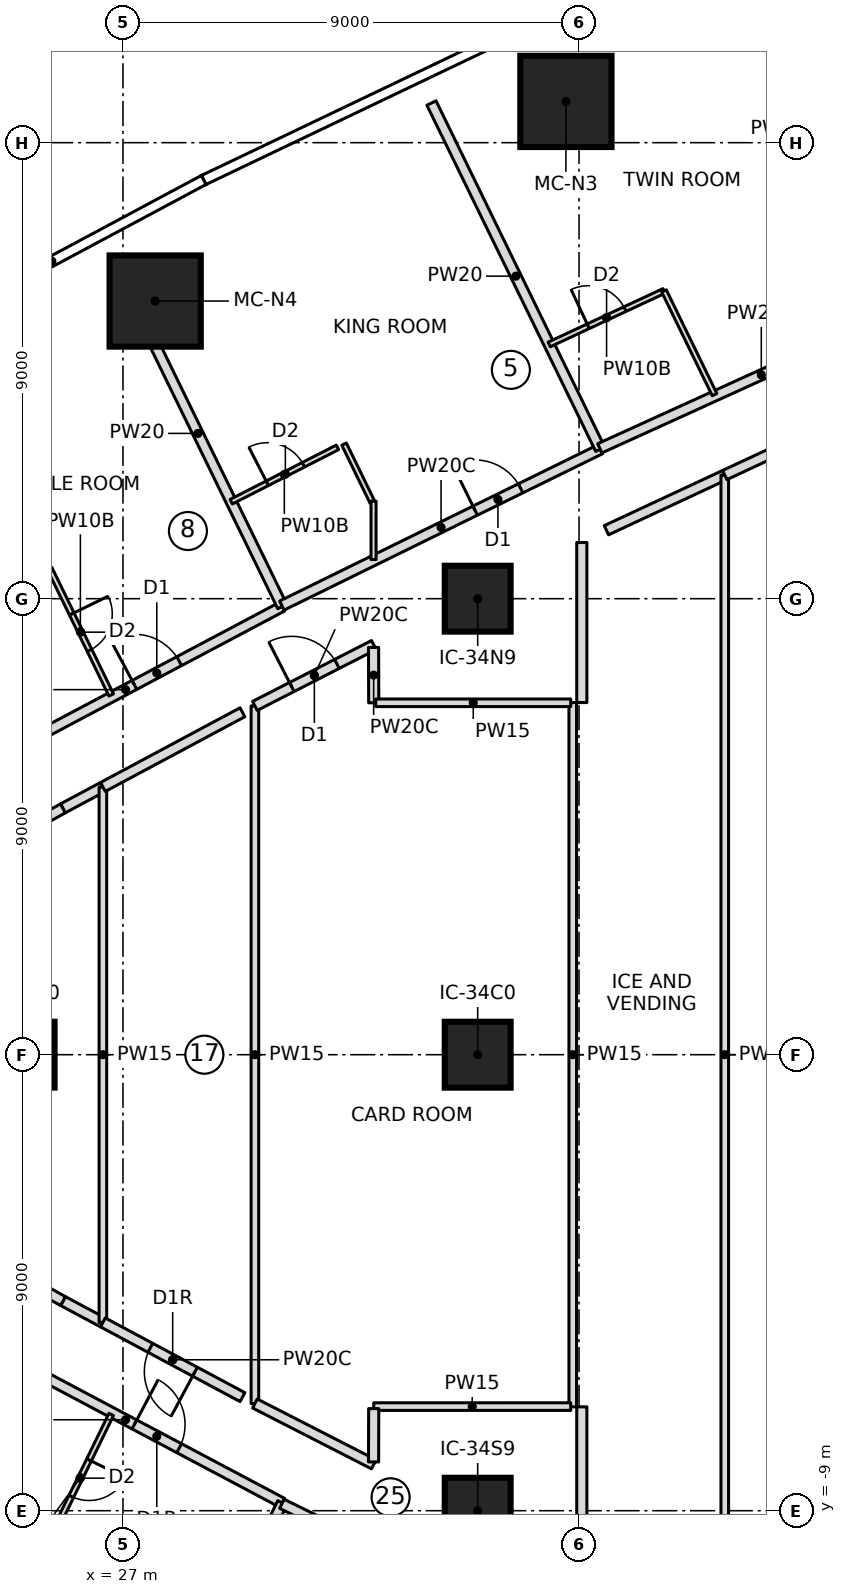
"""IFC4 building model, lengths in metres.
Left out: names, types, materials, properties, quantities, classifications, styles, units other than length and angle.
Written with IfcOpenShell. Run it as: python <this file> out.ifc"""

import sys

from ifc_helpers import new_model, si_unit, direction, frame, frame_2d, origin, origin_2d, place, context, subcontext, project, spatial, rectangle, extrude, element, fill, save


model = new_model("IFC4")
c1 = context("Model", 3, precision=1e-05, world=origin(), true_north=direction((0.0, 1.0)))
c2 = subcontext(c1, "Body", "Model", "MODEL_VIEW")
j1 = project(units=[si_unit("LENGTHUNIT", "METRE"), si_unit("PLANEANGLEUNIT", "RADIAN")], contexts=[c1])
p1 = place(None, origin())
s1 = spatial("IfcSite", under=j1, at=p1, CompositionType="ELEMENT")
p2 = place(p1, origin())
s2 = spatial("IfcBuilding", under=s1, at=p2, CompositionType="ELEMENT")
p3 = place(p2, frame((0.0, 0.0, 71.55)))
s3 = spatial("IfcBuildingStorey", under=s2, at=p3, CompositionType="ELEMENT", Elevation=71.55)
for number, where, z_axis, x_axis in (
    (1, (35.741, 18.814, 0.0), (0.0, 0.0, 1.0), (1.0, 0.0, 0.0)),
    (2, (27.635, 14.874, 0.0), (0.0, 0.0, 1.0), (1.0, 0.0, 0.0)),
):
    element("IfcColumn", number, at=place(p3, frame(where, z_axis=z_axis, x_axis=x_axis)), inside=s3, PredefinedType="COLUMN", context=c2, shape_type="SweptSolid", body=[
        extrude(rectangle(XDim=1.8, YDim=1.8, at=origin_2d()), origin(), (0.0, 0.0, 1.0), 3.55),
    ])
for number, where, z_axis, x_axis in (
    (3, (25.0, 0.0, 0.0), (0.0, 0.0, 1.0), (1.0, 0.0, 0.0)),
    (4, (34.0, -9.0, 0.0), (0.0, 0.0, 1.0), (1.0, 0.0, 0.0)),
    (5, (34.0, 0.0, 0.0), (0.0, 0.0, 1.0), (1.0, 0.0, 0.0)),
    (6, (34.0, 9.0, 0.0), (0.0, 0.0, 1.0), (1.0, 0.0, 0.0)),
):
    element("IfcColumn", number, at=place(p3, frame(where, z_axis=z_axis, x_axis=x_axis)), inside=s3, PredefinedType="COLUMN", context=c2, shape_type="SweptSolid", body=[
        extrude(rectangle(XDim=1.3, YDim=1.3, at=origin_2d()), origin(), (0.0, 0.0, 1.0), 3.55),
    ])
p4 = place(p3, frame((23.957, 5.564, 0.0), z_axis=(0.0, 0.0, 1.0), x_axis=(0.883455325405, 0.468515408513, 0.0)))
e7 = element("IfcWall", 7, at=p4, inside=s3, PredefinedType="PARTITIONING", context=c2, shape_type="SweptSolid", body=[
    extrude(rectangle(XDim=7.004, YDim=0.2, at=frame_2d((3.502, 0.0))), origin(), (0.0, 0.0, 1.0), 3.15),
])
p5 = place(p4, frame((3.7, 0.0, 0.0)))
e8 = element("IfcOpeningElement", 8, at=p5, cuts=e7, PredefinedType="OPENING", context=c2, shape_type="SweptSolid", body=[
    extrude(rectangle(XDim=1.0, YDim=2.1, at=frame_2d((0.5, 1.05))), frame((0.0, 0.11, 0.0), z_axis=(0.0, -1.0, 0.0), x_axis=(1.0, 0.0, 0.0)), (0.0, 0.0, 1.0), 0.22),
])
p6 = place(p3, frame((25.55, 9.597, 0.0), z_axis=(0.0, 0.0, 1.0), x_axis=(0.43822975423, -0.898862994292, 0.0)))
e9 = element("IfcWall", 9, at=p6, inside=s3, PredefinedType="PARTITIONING", context=c2, shape_type="SweptSolid", body=[
    extrude(rectangle(XDim=2.779, YDim=0.1, at=frame_2d((1.389, 0.0))), origin(), (0.0, 0.0, 1.0), 3.15),
])
p7 = place(p6, frame((1.0, 0.0, 0.0)))
e10 = element("IfcOpeningElement", 10, at=p7, cuts=e9, PredefinedType="OPENING", context=c2, shape_type="SweptSolid", body=[
    extrude(rectangle(XDim=0.8, YDim=2.1, at=frame_2d((0.4, 1.05))), frame((0.0, 0.06, 0.0), z_axis=(0.0, -1.0, 0.0), x_axis=(1.0, 0.0, 0.0)), (0.0, 0.0, 1.0), 0.12),
])
p8 = place(p3, frame((30.144, 8.846, 0.0), z_axis=(0.0, 0.0, 1.0), x_axis=(-0.438185054829, 0.898884785567, 0.0)))
e11 = element("IfcWall", 11, at=p8, inside=s3, PredefinedType="PARTITIONING", context=c2, shape_type="SweptSolid", body=[
    extrude(rectangle(XDim=7.601, YDim=0.2, at=frame_2d((3.801, 0.0))), origin(), (0.0, 0.0, 1.0), 3.15),
])
p9 = place(p3, frame((30.135, 8.864, 0.0), z_axis=(0.0, 0.0, 1.0), x_axis=(0.897599118183, 0.44081268475, 0.0)))
e12 = element("IfcWall", 12, at=p9, inside=s3, PredefinedType="PARTITIONING", context=c2, shape_type="SweptSolid", body=[
    extrude(rectangle(XDim=7.0, YDim=0.2, at=frame_2d((3.5, 0.0))), origin(), (0.0, 0.0, 1.0), 3.15),
])
p10 = place(p9, frame((4.25, 0.0, 0.0)))
e13 = element("IfcOpeningElement", 13, at=p10, cuts=e12, PredefinedType="OPENING", context=c2, shape_type="SweptSolid", body=[
    extrude(rectangle(XDim=1.0, YDim=2.1, at=frame_2d((0.5, 1.05))), frame((0.0, 0.11, 0.0), z_axis=(0.0, -1.0, 0.0), x_axis=(1.0, 0.0, 0.0)), (0.0, 0.0, 1.0), 0.22),
])
p11 = place(p3, frame((29.136, 10.914, 0.0), z_axis=(0.0, 0.0, 1.0), x_axis=(0.890219804082, 0.45553122881, 0.0)))
e14 = element("IfcWall", 14, at=p11, inside=s3, PredefinedType="PARTITIONING", context=c2, shape_type="SweptSolid", body=[
    extrude(rectangle(XDim=2.354, YDim=0.1, at=frame_2d((1.177, 0.0))), origin(), (0.0, 0.0, 1.0), 3.15),
])
p12 = place(p11, frame((0.8, 0.0, 0.0)))
e15 = element("IfcOpeningElement", 15, at=p12, cuts=e14, PredefinedType="OPENING", context=c2, shape_type="SweptSolid", body=[
    extrude(rectangle(XDim=0.8, YDim=2.1, at=frame_2d((0.4, 1.05))), frame((0.0, 0.06, 0.0), z_axis=(0.0, -1.0, 0.0), x_axis=(1.0, 0.0, 0.0)), (0.0, 0.0, 1.0), 0.12),
])
p13 = place(p3, frame((31.363, 12.05, 0.0), z_axis=(0.0, 0.0, 1.0), x_axis=(0.438356099343, -0.898801385273, 0.0)))
e16 = element("IfcWall", 16, at=p13, inside=s3, PredefinedType="PARTITIONING", context=c2, shape_type="SweptSolid", body=[
    extrude(rectangle(XDim=1.282, YDim=0.1, at=frame_2d((0.641, 0.0))), origin(), (0.0, 0.0, 1.0), 3.15),
])
p14 = place(p3, frame((36.419, 11.949, 0.0), z_axis=(0.0, 0.0, 1.0), x_axis=(-0.438197705697, 0.898878618459, 0.0)))
e17 = element("IfcWall", 17, at=p14, inside=s3, PredefinedType="PARTITIONING", context=c2, shape_type="SweptSolid", body=[
    extrude(rectangle(XDim=7.601, YDim=0.2, at=frame_2d((3.801, 0.0))), origin(), (0.0, 0.0, 1.0), 3.15),
])
p15 = place(p3, frame((42.784, 14.867, 0.0), z_axis=(0.0, 0.0, 1.0), x_axis=(-0.910238677692, -0.414083988622, 0.0)))
e18 = element("IfcWall", 18, at=p15, inside=s3, PredefinedType="PARTITIONING", context=c2, shape_type="SweptSolid", body=[
    extrude(rectangle(XDim=7.003, YDim=0.2, at=frame_2d((3.501, 0.0))), origin(), (0.0, 0.0, 1.0), 3.15),
])
p16 = place(p15, frame((0.35, 0.0, 0.0)))
e19 = element("IfcOpeningElement", 19, at=p16, cuts=e18, PredefinedType="OPENING", context=c2, shape_type="SweptSolid", body=[
    extrude(rectangle(XDim=1.0, YDim=2.1, at=frame_2d((0.5, 1.05))), frame((0.0, 0.11, 0.0), z_axis=(0.0, -1.0, 0.0), x_axis=(1.0, 0.0, 0.0)), (0.0, 0.0, 1.0), 0.22),
])
p17 = place(p3, frame((35.411, 14.017, 0.0), z_axis=(0.0, 0.0, 1.0), x_axis=(0.906317797926, 0.422596792655, 0.0)))
e20 = element("IfcWall", 20, at=p17, inside=s3, PredefinedType="PARTITIONING", context=c2, shape_type="SweptSolid", body=[
    extrude(rectangle(XDim=2.5, YDim=0.1, at=frame_2d((1.25, 0.0))), origin(), (0.0, 0.0, 1.0), 3.15),
])
p18 = place(p17, frame((0.85, 0.0, 0.0)))
e21 = element("IfcOpeningElement", 21, at=p18, cuts=e20, PredefinedType="OPENING", context=c2, shape_type="SweptSolid", body=[
    extrude(rectangle(XDim=0.8, YDim=2.1, at=frame_2d((0.4, 1.05))), frame((0.0, 0.06, 0.0), z_axis=(0.0, -1.0, 0.0), x_axis=(1.0, 0.0, 0.0)), (0.0, 0.0, 1.0), 0.12),
])
p19 = place(p3, frame((37.677, 15.073, 0.0), z_axis=(0.0, 0.0, 1.0), x_axis=(0.43818492173, -0.89888485045, 0.0)))
e22 = element("IfcWall", 22, at=p19, inside=s3, PredefinedType="PARTITIONING", context=c2, shape_type="SweptSolid", body=[
    extrude(rectangle(XDim=2.277, YDim=0.1, at=frame_2d((1.139, 0.0))), origin(), (0.0, 0.0, 1.0), 3.15),
])
p20 = place(p3, frame((42.793, 14.849, 0.0), z_axis=(0.0, 0.0, 1.0), x_axis=(-0.438214892445, 0.898870239823, 0.0)))
e23 = element("IfcWall", 23, at=p20, inside=s3, PredefinedType="PARTITIONING", context=c2, shape_type="SweptSolid", body=[
    extrude(rectangle(XDim=7.605, YDim=0.2, at=frame_2d((3.802, 0.0))), origin(), (0.0, 0.0, 1.0), 3.15),
])
p21 = place(p3, frame((23.957, -5.564, 0.0), z_axis=(0.0, 0.0, 1.0), x_axis=(0.883455325405, -0.468515408513, 0.0)))
e24 = element("IfcWall", 24, at=p21, inside=s3, PredefinedType="PARTITIONING", context=c2, shape_type="SweptSolid", body=[
    extrude(rectangle(XDim=7.004, YDim=0.2, at=frame_2d((3.502, 0.0))), origin(), (0.0, 0.0, 1.0), 3.15),
])
p22 = place(p21, frame((3.7, 0.0, 0.0)))
e25 = element("IfcOpeningElement", 25, at=p22, cuts=e24, PredefinedType="OPENING", context=c2, shape_type="SweptSolid", body=[
    extrude(rectangle(XDim=1.0, YDim=2.1, at=frame_2d((0.5, 1.05))), frame((0.0, 0.11, 0.0), z_axis=(0.0, -1.0, 0.0), x_axis=(1.0, 0.0, 0.0)), (0.0, 0.0, 1.0), 0.22),
])
p23 = place(p3, frame((26.768, -7.1, 0.0), z_axis=(0.0, 0.0, 1.0), x_axis=(-0.43822975423, -0.898862994292, 0.0)))
e26 = element("IfcWall", 26, at=p23, inside=s3, PredefinedType="PARTITIONING", context=c2, shape_type="SweptSolid", body=[
    extrude(rectangle(XDim=2.779, YDim=0.1, at=frame_2d((1.389, 0.0))), origin(), (0.0, 0.0, 1.0), 3.15),
])
p24 = place(p23, frame((1.0, 0.0, 0.0)))
e27 = element("IfcOpeningElement", 27, at=p24, cuts=e26, PredefinedType="OPENING", context=c2, shape_type="SweptSolid", body=[
    extrude(rectangle(XDim=0.8, YDim=2.1, at=frame_2d((0.4, 1.05))), frame((0.0, 0.06, 0.0), z_axis=(0.0, -1.0, 0.0), x_axis=(1.0, 0.0, 0.0)), (0.0, 0.0, 1.0), 0.12),
])
p25 = place(p3, frame((26.813, -15.678, 0.0), z_axis=(0.0, 0.0, 1.0), x_axis=(0.438185054829, 0.898884785567, 0.0)))
e28 = element("IfcWall", 28, at=p25, inside=s3, PredefinedType="PARTITIONING", context=c2, shape_type="SweptSolid", body=[
    extrude(rectangle(XDim=7.601, YDim=0.2, at=frame_2d((3.801, 0.0))), origin(), (0.0, 0.0, 1.0), 3.15),
])
p26 = place(p3, frame((30.135, -8.864, 0.0), z_axis=(0.0, 0.0, 1.0), x_axis=(0.897599118183, -0.44081268475, 0.0)))
e29 = element("IfcWall", 29, at=p26, inside=s3, PredefinedType="PARTITIONING", context=c2, shape_type="SweptSolid", body=[
    extrude(rectangle(XDim=7.0, YDim=0.2, at=frame_2d((3.5, 0.0))), origin(), (0.0, 0.0, 1.0), 3.15),
])
p27 = place(p26, frame((4.25, 0.0, 0.0)))
e30 = element("IfcOpeningElement", 30, at=p27, cuts=e29, PredefinedType="OPENING", context=c2, shape_type="SweptSolid", body=[
    extrude(rectangle(XDim=1.0, YDim=2.1, at=frame_2d((0.5, 1.05))), frame((0.0, 0.11, 0.0), z_axis=(0.0, -1.0, 0.0), x_axis=(1.0, 0.0, 0.0)), (0.0, 0.0, 1.0), 0.22),
])
p28 = place(p3, frame((22.312, 2.903, 0.0), z_axis=(0.0, 0.0, 1.0), x_axis=(0.872800289292, 0.488077509225, 0.0)))
e31 = element("IfcWall", 31, at=p28, inside=s3, PredefinedType="PARTITIONING", context=c2, shape_type="SweptSolid", body=[
    extrude(rectangle(XDim=4.016, YDim=0.2, at=frame_2d((2.008, 0.0))), origin(), (0.0, 0.0, 1.0), 3.15),
])
p29 = place(p28, frame((1.508, 0.0, 0.0)))
e32 = element("IfcOpeningElement", 32, at=p29, cuts=e31, PredefinedType="OPENING", context=c2, shape_type="SweptSolid", body=[
    extrude(rectangle(XDim=1.0, YDim=2.1, at=frame_2d((0.5, 1.05))), frame((0.0, 0.11, 0.0), z_axis=(0.0, -1.0, 0.0), x_axis=(1.0, 0.0, 0.0)), (0.0, 0.0, 1.0), 0.22),
])
p30 = place(p3, frame((26.604, -5.284, 0.0), z_axis=(0.0, 0.0, 1.0), x_axis=(-0.881715816073, 0.471780902207, 0.0)))
e33 = element("IfcWall", 33, at=p30, inside=s3, PredefinedType="PARTITIONING", context=c2, shape_type="SweptSolid", body=[
    extrude(rectangle(XDim=0.892, YDim=0.2, at=frame_2d((0.446, 0.0))), origin(), (0.0, 0.0, 1.0), 3.15),
])
p31 = place(p3, frame((25.817, -4.863, 0.0), z_axis=(0.0, 0.0, 1.0), x_axis=(-0.872800289292, 0.488077509225, 0.0)))
e34 = element("IfcWall", 34, at=p31, inside=s3, PredefinedType="PARTITIONING", context=c2, shape_type="SweptSolid", body=[
    extrude(rectangle(XDim=4.016, YDim=0.2, at=frame_2d((2.008, 0.0))), origin(), (0.0, 0.0, 1.0), 3.15),
])
p32 = place(p3, frame((25.817, 4.863, 0.0), z_axis=(0.0, 0.0, 1.0), x_axis=(0.881715816073, 0.471780902207, 0.0)))
e35 = element("IfcWall", 35, at=p32, inside=s3, PredefinedType="PARTITIONING", context=c2, shape_type="SweptSolid", body=[
    extrude(rectangle(XDim=0.892, YDim=0.2, at=frame_2d((0.446, 0.0))), origin(), (0.0, 0.0, 1.0), 3.15),
])
p33 = place(p3, frame((26.604, -5.284, 0.0), z_axis=(0.0, 0.0, 1.0), x_axis=(0.0, 1.0, 0.0)))
e36 = element("IfcWall", 36, at=p33, inside=s3, PredefinedType="PARTITIONING", context=c2, shape_type="SweptSolid", body=[
    extrude(rectangle(XDim=10.568, YDim=0.15, at=frame_2d((5.284, 0.0))), origin(), (0.0, 0.0, 1.0), 3.15),
])
p34 = place(p3, frame((29.357, -6.758, 0.0), z_axis=(0.0, 0.0, 1.0), x_axis=(-0.881637943627, 0.471926409895, 0.0)))
e37 = element("IfcWall", 37, at=p34, inside=s3, PredefinedType="PARTITIONING", context=c2, shape_type="SweptSolid", body=[
    extrude(rectangle(XDim=3.124, YDim=0.2, at=frame_2d((1.562, 0.0))), origin(), (0.0, 0.0, 1.0), 3.15),
])
p35 = place(p34, frame((1.062, 0.0, 0.0)))
e38 = element("IfcOpeningElement", 38, at=p35, cuts=e37, PredefinedType="OPENING", context=c2, shape_type="SweptSolid", body=[
    extrude(rectangle(XDim=1.0, YDim=2.1, at=frame_2d((0.5, 1.05))), frame((0.0, 0.11, 0.0), z_axis=(0.0, -1.0, 0.0), x_axis=(1.0, 0.0, 0.0)), (0.0, 0.0, 1.0), 0.22),
])
p36 = place(p3, frame((26.604, 5.284, 0.0), z_axis=(0.0, 0.0, 1.0), x_axis=(0.881637943627, 0.471926409895, 0.0)))
e39 = element("IfcWall", 39, at=p36, inside=s3, PredefinedType="PARTITIONING", context=c2, shape_type="SweptSolid", body=[
    extrude(rectangle(XDim=3.124, YDim=0.2, at=frame_2d((1.562, 0.0))), origin(), (0.0, 0.0, 1.0), 3.15),
])
p37 = place(p3, frame((29.604, -6.884, 0.0), z_axis=(0.0, 0.0, 1.0), x_axis=(0.0, 1.0, 0.0)))
e40 = element("IfcWall", 40, at=p37, inside=s3, PredefinedType="PARTITIONING", context=c2, shape_type="SweptSolid", body=[
    extrude(rectangle(XDim=13.768, YDim=0.15, at=frame_2d((6.884, 0.0))), origin(), (0.0, 0.0, 1.0), 3.15),
])
p38 = place(p3, frame((29.604, 6.884, 0.0), z_axis=(0.0, 0.0, 1.0), x_axis=(0.890220210981, 0.455530433628, 0.0)))
e41 = element("IfcWall", 41, at=p38, inside=s3, PredefinedType="PARTITIONING", context=c2, shape_type="SweptSolid", body=[
    extrude(rectangle(XDim=2.636, YDim=0.2, at=frame_2d((1.318, 0.0))), origin(), (0.0, 0.0, 1.0), 3.15),
])
p39 = place(p38, frame((0.818, 0.0, 0.0)))
e42 = element("IfcOpeningElement", 42, at=p39, cuts=e41, PredefinedType="OPENING", context=c2, shape_type="SweptSolid", body=[
    extrude(rectangle(XDim=1.0, YDim=2.1, at=frame_2d((0.5, 1.05))), frame((0.0, 0.11, 0.0), z_axis=(0.0, -1.0, 0.0), x_axis=(1.0, 0.0, 0.0)), (0.0, 0.0, 1.0), 0.22),
])
p40 = place(p3, frame((31.95, -8.085, 0.0), z_axis=(0.0, 0.0, 1.0), x_axis=(-0.890220210981, 0.455530433628, 0.0)))
e43 = element("IfcWall", 43, at=p40, inside=s3, PredefinedType="PARTITIONING", context=c2, shape_type="SweptSolid", body=[
    extrude(rectangle(XDim=2.636, YDim=0.2, at=frame_2d((1.318, 0.0))), origin(), (0.0, 0.0, 1.0), 3.15),
])
p41 = place(p3, frame((35.876, -6.95, 0.0), z_axis=(0.0, 0.0, 1.0), x_axis=(0.0, 1.0, 0.0)))
e44 = element("IfcWall", 44, at=p41, inside=s3, PredefinedType="PARTITIONING", context=c2, shape_type="SweptSolid", body=[
    extrude(rectangle(XDim=13.9, YDim=0.15, at=frame_2d((6.95, 0.0))), origin(), (0.0, 0.0, 1.0), 3.15),
])
p42 = place(p3, frame((36.54, 10.351, 0.0), z_axis=(0.0, 0.0, 1.0), x_axis=(0.906347616376, 0.422532836937, 0.0)))
e45 = element("IfcWall", 45, at=p42, inside=s3, PredefinedType="PARTITIONING", context=c2, shape_type="SweptSolid", body=[
    extrude(rectangle(XDim=2.578, YDim=0.2, at=frame_2d((1.289, 0.0))), origin(), (0.0, 0.0, 1.0), 3.15),
])
p43 = place(p3, frame((38.876, -11.44, 0.0), z_axis=(0.0, 0.0, 1.0), x_axis=(0.0, 1.0, 0.0)))
e46 = element("IfcWall", 46, at=p43, inside=s3, PredefinedType="PARTITIONING", context=c2, shape_type="SweptSolid", body=[
    extrude(rectangle(XDim=22.88, YDim=0.15, at=frame_2d((11.44, 0.0))), origin(), (0.0, 0.0, 1.0), 3.15),
])
p44 = place(p3, frame((38.876, 11.44, 0.0), z_axis=(0.0, 0.0, 1.0), x_axis=(0.906347874546, 0.422532283152, 0.0)))
e47 = element("IfcWall", 47, at=p44, inside=s3, PredefinedType="PARTITIONING", context=c2, shape_type="SweptSolid", body=[
    extrude(rectangle(XDim=1.438, YDim=0.2, at=frame_2d((0.719, 0.0))), origin(), (0.0, 0.0, 1.0), 3.15),
])
p45 = place(p3, frame((31.945, 10.926, 0.0), z_axis=(0.0, 0.0, 1.0), x_axis=(0.0, -1.0, 0.0)))
e48 = element("IfcWall", 48, at=p45, inside=s3, PredefinedType="PARTITIONING", context=c2, shape_type="SweptSolid", body=[
    extrude(rectangle(XDim=1.153, YDim=0.1, at=frame_2d((0.576, 0.0))), origin(), (0.0, 0.0, 1.0), 3.15),
])
p46 = place(p3, frame((35.836, -6.945, 0.0), z_axis=(0.0, 0.0, 1.0), x_axis=(-0.999999998028, -6.2798292e-05, 0.0)))
e49 = element("IfcWall", 49, at=p46, inside=s3, PredefinedType="PARTITIONING", context=c2, shape_type="SweptSolid", body=[
    extrude(rectangle(XDim=3.888, YDim=0.15, at=frame_2d((1.944, 0.0))), origin(), (0.0, 0.0, 1.0), 3.15),
])
p47 = place(p3, frame((31.948, -6.985, 0.0), z_axis=(0.0, 0.0, 1.0), x_axis=(-0.003248242724, -0.999994724446, 0.0)))
e50 = element("IfcWall", 50, at=p47, inside=s3, PredefinedType="PARTITIONING", context=c2, shape_type="SweptSolid", body=[
    extrude(rectangle(XDim=1.052, YDim=0.2, at=frame_2d((0.526, 0.0))), origin(), (0.0, 0.0, 1.0), 3.15),
])
p48 = place(p3, frame((31.945, 8.037, 0.0), z_axis=(0.0, 0.0, 1.0), x_axis=(0.003129875123, -0.999995101929, 0.0)))
e51 = element("IfcWall", 51, at=p48, inside=s3, PredefinedType="PARTITIONING", context=c2, shape_type="SweptSolid", body=[
    extrude(rectangle(XDim=1.092, YDim=0.2, at=frame_2d((0.546, 0.0))), origin(), (0.0, 0.0, 1.0), 3.15),
])
p49 = place(p3, frame((31.989, 6.945, 0.0), z_axis=(0.0, 0.0, 1.0), x_axis=(0.999999997987, -6.3451777e-05, 0.0)))
e52 = element("IfcWall", 52, at=p49, inside=s3, PredefinedType="PARTITIONING", context=c2, shape_type="SweptSolid", body=[
    extrude(rectangle(XDim=3.848, YDim=0.15, at=frame_2d((1.924, 0.0))), origin(), (0.0, 0.0, 1.0), 3.15),
])
for number, where, z_axis, x_axis in (
    (53, (36.055, -10.108, 0.0), (0.0, 0.0, 1.0), (0.0, 1.0, 0.0)),
    (54, (36.055, 6.95, 0.0), (0.0, 0.0, 1.0), (0.0, 1.0, 0.0)),
):
    element("IfcWall", number, at=place(p3, frame(where, z_axis=z_axis, x_axis=x_axis)), inside=s3, PredefinedType="PARTITIONING", context=c2, shape_type="SweptSolid", body=[
        extrude(rectangle(XDim=3.158, YDim=0.2, at=frame_2d((1.579, 0.0))), origin(), (0.0, 0.0, 1.0), 3.15),
    ])
p50 = place(p7, origin())
e55 = element("IfcDoor", 55, at=p50, inside=s3, OperationType="SINGLE_SWING_LEFT", PredefinedType="DOOR", context=c2, shape_type="SweptSolid", body=[
    extrude(rectangle(XDim=0.8, YDim=2.1, at=frame_2d((0.4, 1.05))), frame((0.0, 0.025, 0.0), z_axis=(0.0, -1.0, 0.0), x_axis=(1.0, 0.0, 0.0)), (0.0, 0.0, 1.0), 0.05),
])
fill(e10, e55)
p51 = place(p5, origin())
e56 = element("IfcDoor", 56, at=p51, inside=s3, OperationType="SINGLE_SWING_LEFT", PredefinedType="DOOR", context=c2, shape_type="SweptSolid", body=[
    extrude(rectangle(XDim=1.0, YDim=2.1, at=frame_2d((0.5, 1.05))), frame((0.0, 0.025, 0.0), z_axis=(0.0, -1.0, 0.0), x_axis=(1.0, 0.0, 0.0)), (0.0, 0.0, 1.0), 0.05),
])
fill(e8, e56)
p52 = place(p12, origin())
e57 = element("IfcDoor", 57, at=p52, inside=s3, OperationType="SINGLE_SWING_LEFT", PredefinedType="DOOR", context=c2, shape_type="SweptSolid", body=[
    extrude(rectangle(XDim=0.8, YDim=2.1, at=frame_2d((0.4, 1.05))), frame((0.0, 0.025, 0.0), z_axis=(0.0, -1.0, 0.0), x_axis=(1.0, 0.0, 0.0)), (0.0, 0.0, 1.0), 0.05),
])
fill(e15, e57)
p53 = place(p10, origin())
e58 = element("IfcDoor", 58, at=p53, inside=s3, OperationType="SINGLE_SWING_LEFT", PredefinedType="DOOR", context=c2, shape_type="SweptSolid", body=[
    extrude(rectangle(XDim=1.0, YDim=2.1, at=frame_2d((0.5, 1.05))), frame((0.0, 0.025, 0.0), z_axis=(0.0, -1.0, 0.0), x_axis=(1.0, 0.0, 0.0)), (0.0, 0.0, 1.0), 0.05),
])
fill(e13, e58)
p54 = place(p18, origin())
e59 = element("IfcDoor", 59, at=p54, inside=s3, OperationType="SINGLE_SWING_LEFT", PredefinedType="DOOR", context=c2, shape_type="SweptSolid", body=[
    extrude(rectangle(XDim=0.8, YDim=2.1, at=frame_2d((0.4, 1.05))), frame((0.0, 0.025, 0.0), z_axis=(0.0, -1.0, 0.0), x_axis=(1.0, 0.0, 0.0)), (0.0, 0.0, 1.0), 0.05),
])
fill(e21, e59)
p55 = place(p24, origin())
e60 = element("IfcDoor", 60, at=p55, inside=s3, OperationType="SINGLE_SWING_LEFT", PredefinedType="DOOR", context=c2, shape_type="SweptSolid", body=[
    extrude(rectangle(XDim=0.8, YDim=2.1, at=frame_2d((0.4, 1.05))), frame((0.0, 0.025, 0.0), z_axis=(0.0, -1.0, 0.0), x_axis=(1.0, 0.0, 0.0)), (0.0, 0.0, 1.0), 0.05),
])
fill(e27, e60)
p56 = place(p22, origin())
e61 = element("IfcDoor", 61, at=p56, inside=s3, OperationType="SINGLE_SWING_RIGHT", PredefinedType="DOOR", context=c2, shape_type="SweptSolid", body=[
    extrude(rectangle(XDim=1.0, YDim=2.1, at=frame_2d((0.5, 1.05))), frame((0.0, 0.025, 0.0), z_axis=(0.0, -1.0, 0.0), x_axis=(1.0, 0.0, 0.0)), (0.0, 0.0, 1.0), 0.05),
])
fill(e25, e61)
p57 = place(p35, origin())
e62 = element("IfcDoor", 62, at=p57, inside=s3, OperationType="SINGLE_SWING_RIGHT", PredefinedType="DOOR", context=c2, shape_type="SweptSolid", body=[
    extrude(rectangle(XDim=1.0, YDim=2.1, at=frame_2d((0.5, 1.05))), frame((0.0, 0.025, 0.0), z_axis=(0.0, -1.0, 0.0), x_axis=(1.0, 0.0, 0.0)), (0.0, 0.0, 1.0), 0.05),
])
fill(e38, e62)
p58 = place(p39, origin())
e63 = element("IfcDoor", 63, at=p58, inside=s3, OperationType="SINGLE_SWING_LEFT", PredefinedType="DOOR", context=c2, shape_type="SweptSolid", body=[
    extrude(rectangle(XDim=1.0, YDim=2.1, at=frame_2d((0.5, 1.05))), frame((0.0, 0.025, 0.0), z_axis=(0.0, -1.0, 0.0), x_axis=(1.0, 0.0, 0.0)), (0.0, 0.0, 1.0), 0.05),
])
fill(e42, e63)
save(model, sys.argv[1])
